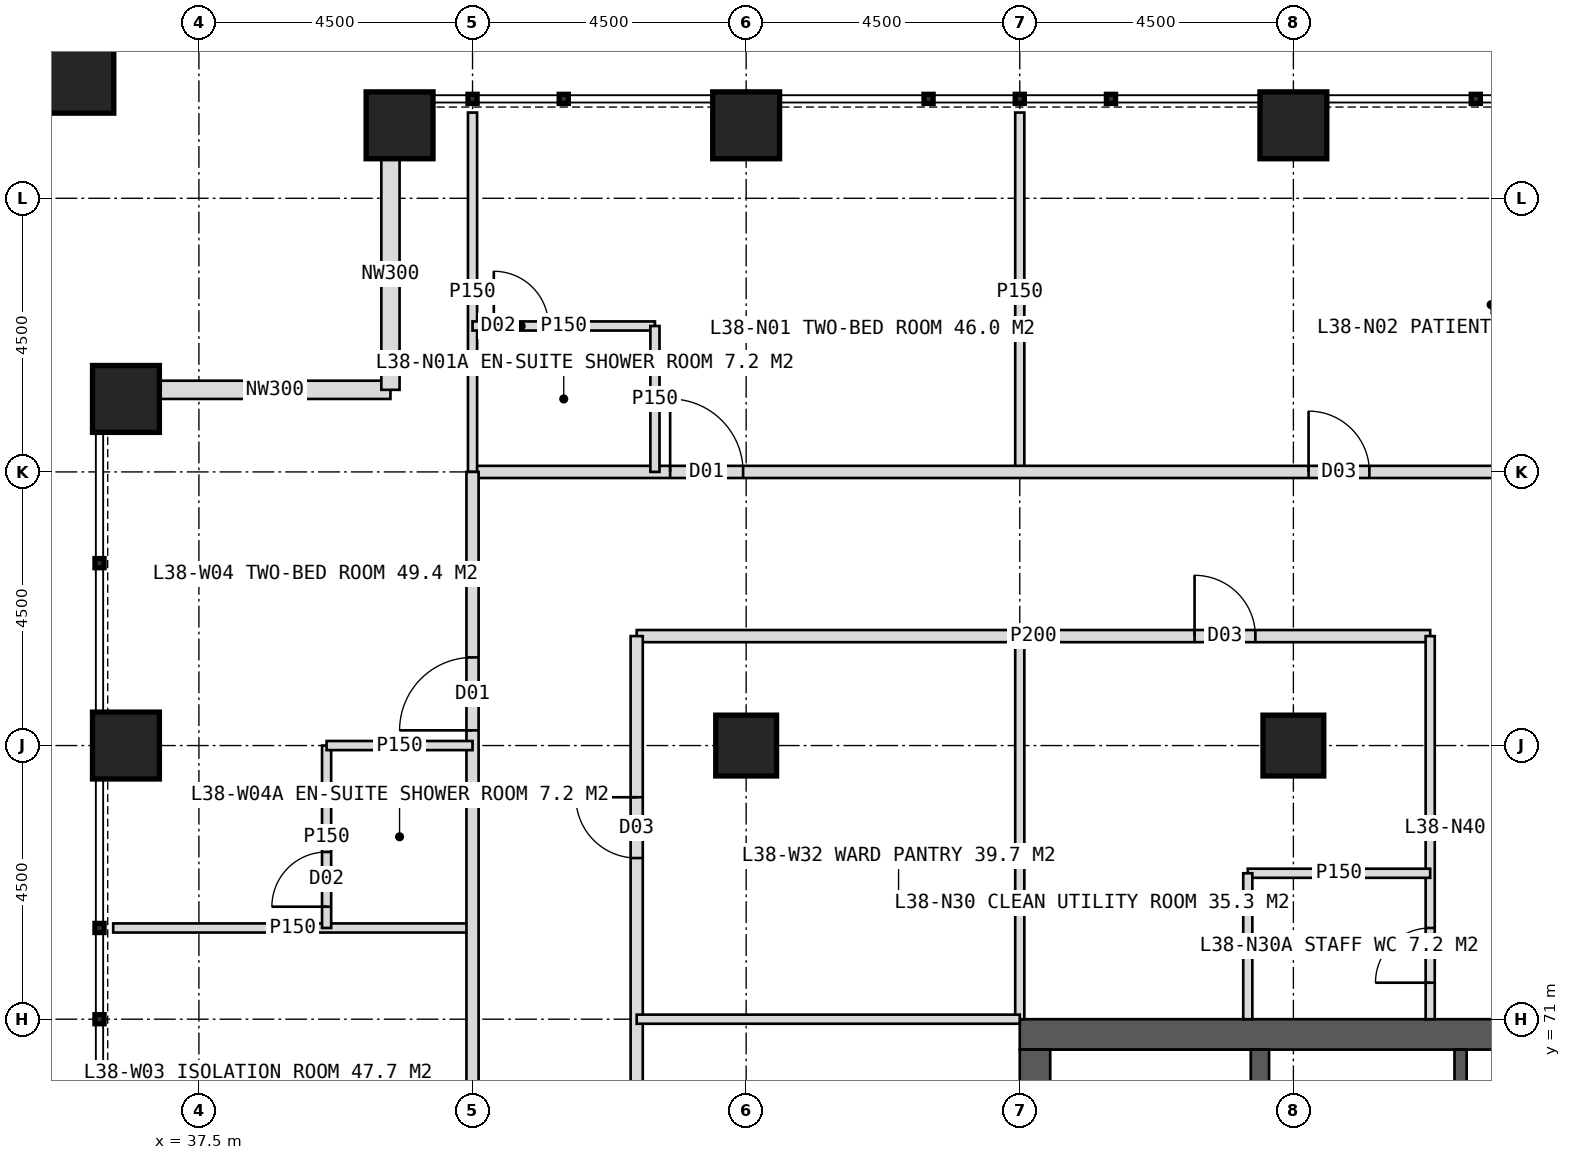
"""IFC4 building model, lengths in metres.
Left out: names, types, materials, properties, quantities, classifications, styles, units other than length and angle.
Written with IfcOpenShell. Run it as: python <this file> out.ifc"""

import sys

from ifc_helpers import new_model, si_unit, direction, frame, frame_2d, origin, origin_2d, place, context, subcontext, project, spatial, rectangle, hollow_rectangle, extrude, element, fill, save


model = new_model("IFC4")
c1 = context("Model", 3, precision=1e-05, world=origin(), true_north=direction((0.0, 1.0)))
c2 = subcontext(c1, "Body", "Model", "MODEL_VIEW")
j1 = project(units=[si_unit("LENGTHUNIT", "METRE"), si_unit("PLANEANGLEUNIT", "RADIAN")], contexts=[c1])
p1 = place(None, origin())
s1 = spatial("IfcSite", under=j1, at=p1, CompositionType="ELEMENT")
p2 = place(p1, origin())
s2 = spatial("IfcBuilding", under=s1, at=p2, CompositionType="ELEMENT")
p3 = place(p2, frame((0.0, 0.0, 160.0)))
s3 = spatial("IfcBuildingStorey", under=s2, at=p3, CompositionType="ELEMENT", Elevation=160.0)
p4 = place(p3, frame((51.0, 70.75, 0.0), z_axis=(0.0, 0.0, 1.0), x_axis=(1.0, 0.0, 0.0)))
e1 = element("IfcWall", 1, at=p4, inside=s3, PredefinedType="SHEAR", context=c2, shape_type="SweptSolid", body=[
    extrude(rectangle(XDim=18.0, YDim=0.5, at=frame_2d((9.0, 0.0))), origin(), (0.0, 0.0, 1.0), 4.0),
])
p5 = place(p4, frame((8.1, 0.0, 0.0)))
e2 = element("IfcOpeningElement", 2, at=p5, cuts=e1, PredefinedType="OPENING", context=c2, shape_type="SweptSolid", body=[
    extrude(rectangle(XDim=1.8, YDim=2.2, at=frame_2d((0.9, 1.1))), frame((0.0, 0.26, 0.0), z_axis=(0.0, -1.0, 0.0), x_axis=(1.0, 0.0, 0.0)), (0.0, 0.0, 1.0), 0.52),
])
p6 = place(p3, frame((51.25, 53.5, 0.0), z_axis=(0.0, 0.0, 1.0), x_axis=(0.0, 1.0, 0.0)))
e3 = element("IfcWall", 3, at=p6, inside=s3, PredefinedType="SHEAR", context=c2, shape_type="SweptSolid", body=[
    extrude(rectangle(XDim=17.0, YDim=0.5, at=frame_2d((8.5, 0.0))), origin(), (0.0, 0.0, 1.0), 4.0),
])
p7 = place(p6, frame((6.0, 0.0, 0.0)))
e4 = element("IfcOpeningElement", 4, at=p7, cuts=e3, PredefinedType="OPENING", context=c2, shape_type="SweptSolid", body=[
    extrude(rectangle(XDim=1.5, YDim=2.2, at=frame_2d((0.75, 1.1))), frame((0.0, 0.26, 0.0), z_axis=(0.0, -1.0, 0.0), x_axis=(1.0, 0.0, 0.0)), (0.0, 0.0, 1.0), 0.52),
])
p8 = place(p3, frame((54.95, 53.5, 0.0), z_axis=(0.0, 0.0, 1.0), x_axis=(0.0, 1.0, 0.0)))
e5 = element("IfcWall", 5, at=p8, inside=s3, PredefinedType="SHEAR", context=c2, shape_type="SweptSolid", body=[
    extrude(rectangle(XDim=17.0, YDim=0.3, at=frame_2d((8.5, 0.0))), origin(), (0.0, 0.0, 1.0), 4.0),
])
p9 = place(p3, frame((58.25, 53.5, 0.0), z_axis=(0.0, 0.0, 1.0), x_axis=(0.0, 1.0, 0.0)))
e6 = element("IfcWall", 6, at=p9, inside=s3, PredefinedType="SHEAR", context=c2, shape_type="SweptSolid", body=[
    extrude(rectangle(XDim=17.0, YDim=0.2, at=frame_2d((8.5, 0.0))), origin(), (0.0, 0.0, 1.0), 4.0),
])
p10 = place(p9, frame((1.375, 0.0, 0.0)))
e7 = element("IfcOpeningElement", 7, at=p10, cuts=e6, PredefinedType="OPENING", context=c2, shape_type="SweptSolid", body=[
    extrude(rectangle(XDim=1.4, YDim=2.2, at=frame_2d((0.7, 1.1))), frame((0.0, 0.11, 0.0), z_axis=(0.0, -1.0, 0.0), x_axis=(1.0, 0.0, 0.0)), (0.0, 0.0, 1.0), 0.22),
])
p11 = place(p9, frame((5.675, 0.0, 0.0)))
e8 = element("IfcOpeningElement", 8, at=p11, cuts=e6, PredefinedType="OPENING", context=c2, shape_type="SweptSolid", body=[
    extrude(rectangle(XDim=1.4, YDim=2.2, at=frame_2d((0.7, 1.1))), frame((0.0, 0.11, 0.0), z_axis=(0.0, -1.0, 0.0), x_axis=(1.0, 0.0, 0.0)), (0.0, 0.0, 1.0), 0.22),
])
for number, where, z_axis, x_axis in (
    (9, (46.5, 75.5, 0.0), (0.0, 0.0, 1.0), (1.0, 0.0, 0.0)),
    (10, (55.5, 75.5, 0.0), (0.0, 0.0, 1.0), (1.0, 0.0, 0.0)),
):
    element("IfcColumn", number, at=place(p3, frame(where, z_axis=z_axis, x_axis=x_axis)), inside=s3, PredefinedType="COLUMN", context=c2, shape_type="SweptSolid", body=[
        extrude(hollow_rectangle(XDim=1.0, YDim=1.0, WallThickness=0.1, at=origin_2d()), origin(), (0.0, 0.0, 1.0), 4.0),
    ])
for number, where, z_axis, x_axis in (
    (11, (40.8, 85.7, 0.0), (0.0, 0.0, 1.0), (1.0, 0.0, 0.0)),
    (12, (46.5, 85.7, 0.0), (0.0, 0.0, 1.0), (1.0, 0.0, 0.0)),
    (13, (55.5, 85.7, 0.0), (0.0, 0.0, 1.0), (1.0, 0.0, 0.0)),
    (14, (36.3, 75.5, 0.0), (0.0, 0.0, 1.0), (1.0, 0.0, 0.0)),
    (15, (36.3, 81.2, 0.0), (0.0, 0.0, 1.0), (1.0, 0.0, 0.0)),
):
    element("IfcColumn", number, at=place(p3, frame(where, z_axis=z_axis, x_axis=x_axis)), inside=s3, PredefinedType="COLUMN", context=c2, shape_type="SweptSolid", body=[
        extrude(hollow_rectangle(XDim=1.1, YDim=1.1, WallThickness=0.1, at=origin_2d()), origin(), (0.0, 0.0, 1.0), 4.0),
    ])
p12 = place(p3, frame((35.4, 86.6, 0.0), z_axis=(0.0, 0.0, 1.0), x_axis=(1.0, 0.0, 0.0)))
e16 = element("IfcColumn", 16, at=p12, inside=s3, PredefinedType="COLUMN", context=c2, shape_type="SweptSolid", body=[
    extrude(hollow_rectangle(XDim=1.4, YDim=1.4, WallThickness=0.08, at=origin_2d()), origin(), (0.0, 0.0, 1.0), 4.0),
])
for number, where, z_axis, x_axis in (
    (17, (36.85, 81.35, 0.0), (0.0, 0.0, 1.0), (1.0, 0.0, 0.0)),
    (18, (40.65, 81.35, 0.0), (0.0, 0.0, 1.0), (0.0, 1.0, 0.0)),
):
    element("IfcWall", number, at=place(p3, frame(where, z_axis=z_axis, x_axis=x_axis)), inside=s3, PredefinedType="ELEMENTEDWALL", context=c2, shape_type="SweptSolid", body=[
        extrude(rectangle(XDim=3.8, YDim=0.3, at=frame_2d((1.9, 0.0))), origin(), (0.0, 0.0, 1.0), 4.0),
    ])
p13 = place(p3, frame((51.0, 80.0, 0.0), z_axis=(0.0, 0.0, 1.0), x_axis=(0.0, 1.0, 0.0)))
e19 = element("IfcWall", 19, at=p13, inside=s3, PredefinedType="PARTITIONING", context=c2, shape_type="SweptSolid", body=[
    extrude(rectangle(XDim=5.91, YDim=0.15, at=frame_2d((2.955, 0.0))), origin(), (0.0, 0.0, 1.0), 3.75),
])
p14 = place(p3, frame((42.0, 80.0, 0.0), z_axis=(0.0, 0.0, 1.0), x_axis=(1.0, 0.0, 0.0)))
e20 = element("IfcWall", 20, at=p14, inside=s3, PredefinedType="PARTITIONING", context=c2, shape_type="SweptSolid", body=[
    extrude(rectangle(XDim=36.0, YDim=0.2, at=frame_2d((18.0, 0.0))), origin(), (0.0, 0.0, 1.0), 3.75),
])
p15 = place(p14, frame((3.25, 0.0, 0.0)))
e21 = element("IfcOpeningElement", 21, at=p15, cuts=e20, PredefinedType="OPENING", context=c2, shape_type="SweptSolid", body=[
    extrude(rectangle(XDim=1.2, YDim=2.2, at=frame_2d((0.6, 1.1))), frame((0.0, 0.11, 0.0), z_axis=(0.0, -1.0, 0.0), x_axis=(1.0, 0.0, 0.0)), (0.0, 0.0, 1.0), 0.22),
])
p16 = place(p14, frame((13.75, 0.0, 0.0)))
e22 = element("IfcOpeningElement", 22, at=p16, cuts=e20, PredefinedType="OPENING", context=c2, shape_type="SweptSolid", body=[
    extrude(rectangle(XDim=1.0, YDim=2.1, at=frame_2d((0.5, 1.05))), frame((0.0, 0.11, 0.0), z_axis=(0.0, -1.0, 0.0), x_axis=(1.0, 0.0, 0.0)), (0.0, 0.0, 1.0), 0.22),
])
p17 = place(p14, frame((22.15, 0.0, 0.0)))
e23 = element("IfcOpeningElement", 23, at=p17, cuts=e20, PredefinedType="OPENING", context=c2, shape_type="SweptSolid", body=[
    extrude(rectangle(XDim=1.2, YDim=2.2, at=frame_2d((0.6, 1.1))), frame((0.0, 0.11, 0.0), z_axis=(0.0, -1.0, 0.0), x_axis=(1.0, 0.0, 0.0)), (0.0, 0.0, 1.0), 0.22),
])
p18 = place(p3, frame((42.0, 80.0, 0.0), z_axis=(0.0, 0.0, 1.0), x_axis=(0.0, 1.0, 0.0)))
e24 = element("IfcWall", 24, at=p18, inside=s3, PredefinedType="PARTITIONING", context=c2, shape_type="SweptSolid", body=[
    extrude(rectangle(XDim=5.91, YDim=0.15, at=frame_2d((2.955, 0.0))), origin(), (0.0, 0.0, 1.0), 3.75),
])
p19 = place(p3, frame((42.0, 82.4, 0.0), z_axis=(0.0, 0.0, 1.0), x_axis=(1.0, 0.0, 0.0)))
e25 = element("IfcWall", 25, at=p19, inside=s3, PredefinedType="PARTITIONING", context=c2, shape_type="SweptSolid", body=[
    extrude(rectangle(XDim=3.0, YDim=0.15, at=frame_2d((1.5, 0.0))), origin(), (0.0, 0.0, 1.0), 3.75),
])
p20 = place(p19, frame((0.35, 0.0, 0.0)))
e26 = element("IfcOpeningElement", 26, at=p20, cuts=e25, PredefinedType="OPENING", context=c2, shape_type="SweptSolid", body=[
    extrude(rectangle(XDim=0.9, YDim=2.1, at=frame_2d((0.45, 1.05))), frame((0.0, 0.085, 0.0), z_axis=(0.0, -1.0, 0.0), x_axis=(1.0, 0.0, 0.0)), (0.0, 0.0, 1.0), 0.17),
])
p21 = place(p3, frame((45.0, 80.0, 0.0), z_axis=(0.0, 0.0, 1.0), x_axis=(0.0, 1.0, 0.0)))
e27 = element("IfcWall", 27, at=p21, inside=s3, PredefinedType="PARTITIONING", context=c2, shape_type="SweptSolid", body=[
    extrude(rectangle(XDim=2.4, YDim=0.15, at=frame_2d((1.2, 0.0))), origin(), (0.0, 0.0, 1.0), 3.75),
])
p22 = place(p3, frame((51.0, 71.0, 0.0), z_axis=(0.0, 0.0, 1.0), x_axis=(0.0, 1.0, 0.0)))
e28 = element("IfcWall", 28, at=p22, inside=s3, PredefinedType="PARTITIONING", context=c2, shape_type="SweptSolid", body=[
    extrude(rectangle(XDim=6.3, YDim=0.15, at=frame_2d((3.15, 0.0))), origin(), (0.0, 0.0, 1.0), 3.75),
])
p23 = place(p3, frame((44.7, 77.3, 0.0), z_axis=(0.0, 0.0, 1.0), x_axis=(1.0, 0.0, 0.0)))
e29 = element("IfcWall", 29, at=p23, inside=s3, PredefinedType="PARTITIONING", context=c2, shape_type="SweptSolid", body=[
    extrude(rectangle(XDim=13.05, YDim=0.2, at=frame_2d((6.525, 0.0))), origin(), (0.0, 0.0, 1.0), 3.75),
])
p24 = place(p23, frame((9.175, 0.0, 0.0)))
e30 = element("IfcOpeningElement", 30, at=p24, cuts=e29, PredefinedType="OPENING", context=c2, shape_type="SweptSolid", body=[
    extrude(rectangle(XDim=1.0, YDim=2.1, at=frame_2d((0.5, 1.05))), frame((0.0, 0.11, 0.0), z_axis=(0.0, -1.0, 0.0), x_axis=(1.0, 0.0, 0.0)), (0.0, 0.0, 1.0), 0.22),
])
p25 = place(p3, frame((57.75, 71.0, 0.0), z_axis=(0.0, 0.0, 1.0), x_axis=(0.0, 1.0, 0.0)))
e31 = element("IfcWall", 31, at=p25, inside=s3, PredefinedType="PARTITIONING", context=c2, shape_type="SweptSolid", body=[
    extrude(rectangle(XDim=6.3, YDim=0.15, at=frame_2d((3.15, 0.0))), origin(), (0.0, 0.0, 1.0), 3.75),
])
p26 = place(p25, frame((0.6, 0.0, 0.0)))
e32 = element("IfcOpeningElement", 32, at=p26, cuts=e31, PredefinedType="OPENING", context=c2, shape_type="SweptSolid", body=[
    extrude(rectangle(XDim=0.9, YDim=2.1, at=frame_2d((0.45, 1.05))), frame((0.0, 0.085, 0.0), z_axis=(0.0, -1.0, 0.0), x_axis=(1.0, 0.0, 0.0)), (0.0, 0.0, 1.0), 0.17),
])
p27 = place(p3, frame((54.75, 73.4, 0.0), z_axis=(0.0, 0.0, 1.0), x_axis=(1.0, 0.0, 0.0)))
e33 = element("IfcWall", 33, at=p27, inside=s3, PredefinedType="PARTITIONING", context=c2, shape_type="SweptSolid", body=[
    extrude(rectangle(XDim=3.0, YDim=0.15, at=frame_2d((1.5, 0.0))), origin(), (0.0, 0.0, 1.0), 3.75),
])
p28 = place(p3, frame((54.75, 71.0, 0.0), z_axis=(0.0, 0.0, 1.0), x_axis=(0.0, 1.0, 0.0)))
e34 = element("IfcWall", 34, at=p28, inside=s3, PredefinedType="PARTITIONING", context=c2, shape_type="SweptSolid", body=[
    extrude(rectangle(XDim=2.4, YDim=0.15, at=frame_2d((1.2, 0.0))), origin(), (0.0, 0.0, 1.0), 3.75),
])
p29 = place(p3, frame((42.0, 72.5, 0.0), z_axis=(0.0, 0.0, 1.0), x_axis=(-1.0, 0.0, 0.0)))
e35 = element("IfcWall", 35, at=p29, inside=s3, PredefinedType="PARTITIONING", context=c2, shape_type="SweptSolid", body=[
    extrude(rectangle(XDim=5.91, YDim=0.15, at=frame_2d((2.955, 0.0))), origin(), (0.0, 0.0, 1.0), 3.75),
])
p30 = place(p3, frame((42.0, 44.0, 0.0), z_axis=(0.0, 0.0, 1.0), x_axis=(0.0, 1.0, 0.0)))
e36 = element("IfcWall", 36, at=p30, inside=s3, PredefinedType="PARTITIONING", context=c2, shape_type="SweptSolid", body=[
    extrude(rectangle(XDim=36.0, YDim=0.2, at=frame_2d((18.0, 0.0))), origin(), (0.0, 0.0, 1.0), 3.75),
])
p31 = place(p30, frame((3.25, 0.0, 0.0)))
e37 = element("IfcOpeningElement", 37, at=p31, cuts=e36, PredefinedType="OPENING", context=c2, shape_type="SweptSolid", body=[
    extrude(rectangle(XDim=1.2, YDim=2.2, at=frame_2d((0.6, 1.1))), frame((0.0, 0.11, 0.0), z_axis=(0.0, -1.0, 0.0), x_axis=(1.0, 0.0, 0.0)), (0.0, 0.0, 1.0), 0.22),
])
p32 = place(p30, frame((12.25, 0.0, 0.0)))
e38 = element("IfcOpeningElement", 38, at=p32, cuts=e36, PredefinedType="OPENING", context=c2, shape_type="SweptSolid", body=[
    extrude(rectangle(XDim=1.2, YDim=2.2, at=frame_2d((0.6, 1.1))), frame((0.0, 0.11, 0.0), z_axis=(0.0, -1.0, 0.0), x_axis=(1.0, 0.0, 0.0)), (0.0, 0.0, 1.0), 0.22),
])
p33 = place(p30, frame((21.25, 0.0, 0.0)))
e39 = element("IfcOpeningElement", 39, at=p33, cuts=e36, PredefinedType="OPENING", context=c2, shape_type="SweptSolid", body=[
    extrude(rectangle(XDim=1.2, YDim=2.2, at=frame_2d((0.6, 1.1))), frame((0.0, 0.11, 0.0), z_axis=(0.0, -1.0, 0.0), x_axis=(1.0, 0.0, 0.0)), (0.0, 0.0, 1.0), 0.22),
])
p34 = place(p30, frame((31.75, 0.0, 0.0)))
e40 = element("IfcOpeningElement", 40, at=p34, cuts=e36, PredefinedType="OPENING", context=c2, shape_type="SweptSolid", body=[
    extrude(rectangle(XDim=1.2, YDim=2.2, at=frame_2d((0.6, 1.1))), frame((0.0, 0.11, 0.0), z_axis=(0.0, -1.0, 0.0), x_axis=(1.0, 0.0, 0.0)), (0.0, 0.0, 1.0), 0.22),
])
p35 = place(p3, frame((39.6, 72.5, 0.0), z_axis=(0.0, 0.0, 1.0), x_axis=(0.0, 1.0, 0.0)))
e41 = element("IfcWall", 41, at=p35, inside=s3, PredefinedType="PARTITIONING", context=c2, shape_type="SweptSolid", body=[
    extrude(rectangle(XDim=3.0, YDim=0.15, at=frame_2d((1.5, 0.0))), origin(), (0.0, 0.0, 1.0), 3.75),
])
p36 = place(p35, frame((0.35, 0.0, 0.0)))
e42 = element("IfcOpeningElement", 42, at=p36, cuts=e41, PredefinedType="OPENING", context=c2, shape_type="SweptSolid", body=[
    extrude(rectangle(XDim=0.9, YDim=2.1, at=frame_2d((0.45, 1.05))), frame((0.0, 0.085, 0.0), z_axis=(0.0, -1.0, 0.0), x_axis=(1.0, 0.0, 0.0)), (0.0, 0.0, 1.0), 0.17),
])
p37 = place(p3, frame((42.0, 75.5, 0.0), z_axis=(0.0, 0.0, 1.0), x_axis=(-1.0, 0.0, 0.0)))
e43 = element("IfcWall", 43, at=p37, inside=s3, PredefinedType="PARTITIONING", context=c2, shape_type="SweptSolid", body=[
    extrude(rectangle(XDim=2.4, YDim=0.15, at=frame_2d((1.2, 0.0))), origin(), (0.0, 0.0, 1.0), 2.95),
])
p38 = place(p3, frame((44.7, 62.0, 0.0), z_axis=(0.0, 0.0, 1.0), x_axis=(0.0, 1.0, 0.0)))
e44 = element("IfcWall", 44, at=p38, inside=s3, PredefinedType="PARTITIONING", context=c2, shape_type="SweptSolid", body=[
    extrude(rectangle(XDim=15.3, YDim=0.2, at=frame_2d((7.65, 0.0))), origin(), (0.0, 0.0, 1.0), 3.75),
])
p39 = place(p38, frame((4.0, 0.0, 0.0)))
e45 = element("IfcOpeningElement", 45, at=p39, cuts=e44, PredefinedType="OPENING", context=c2, shape_type="SweptSolid", body=[
    extrude(rectangle(XDim=1.0, YDim=2.1, at=frame_2d((0.5, 1.05))), frame((0.0, 0.11, 0.0), z_axis=(0.0, -1.0, 0.0), x_axis=(1.0, 0.0, 0.0)), (0.0, 0.0, 1.0), 0.22),
])
p40 = place(p38, frame((11.65, 0.0, 0.0)))
e46 = element("IfcOpeningElement", 46, at=p40, cuts=e44, PredefinedType="OPENING", context=c2, shape_type="SweptSolid", body=[
    extrude(rectangle(XDim=1.0, YDim=2.1, at=frame_2d((0.5, 1.05))), frame((0.0, 0.11, 0.0), z_axis=(0.0, -1.0, 0.0), x_axis=(1.0, 0.0, 0.0)), (0.0, 0.0, 1.0), 0.22),
])
p41 = place(p3, frame((51.0, 71.0, 0.0), z_axis=(0.0, 0.0, 1.0), x_axis=(-1.0, 0.0, 0.0)))
e47 = element("IfcWall", 47, at=p41, inside=s3, PredefinedType="PARTITIONING", context=c2, shape_type="SweptSolid", body=[
    extrude(rectangle(XDim=6.3, YDim=0.15, at=frame_2d((3.15, 0.0))), origin(), (0.0, 0.0, 1.0), 3.75),
])
p42 = place(p15, origin())
e48 = element("IfcDoor", 48, at=p42, inside=s3, OperationType="SINGLE_SWING_LEFT", PredefinedType="DOOR", context=c2, shape_type="SweptSolid", body=[
    extrude(rectangle(XDim=1.2, YDim=2.2, at=frame_2d((0.6, 1.1))), frame((0.0, 0.025, 0.0), z_axis=(0.0, -1.0, 0.0), x_axis=(1.0, 0.0, 0.0)), (0.0, 0.0, 1.0), 0.05),
])
fill(e21, e48)
p43 = place(p20, origin())
e49 = element("IfcDoor", 49, at=p43, inside=s3, OperationType="SINGLE_SWING_LEFT", PredefinedType="DOOR", context=c2, shape_type="SweptSolid", body=[
    extrude(rectangle(XDim=0.9, YDim=2.1, at=frame_2d((0.45, 1.05))), frame((0.0, 0.025, 0.0), z_axis=(0.0, -1.0, 0.0), x_axis=(1.0, 0.0, 0.0)), (0.0, 0.0, 1.0), 0.05),
])
fill(e26, e49)
p44 = place(p16, origin())
e50 = element("IfcDoor", 50, at=p44, inside=s3, OperationType="SINGLE_SWING_LEFT", PredefinedType="DOOR", context=c2, shape_type="SweptSolid", body=[
    extrude(rectangle(XDim=1.0, YDim=2.1, at=frame_2d((0.5, 1.05))), frame((0.0, 0.025, 0.0), z_axis=(0.0, -1.0, 0.0), x_axis=(1.0, 0.0, 0.0)), (0.0, 0.0, 1.0), 0.05),
])
fill(e22, e50)
p45 = place(p26, origin())
e51 = element("IfcDoor", 51, at=p45, inside=s3, OperationType="SINGLE_SWING_LEFT", PredefinedType="DOOR", context=c2, shape_type="SweptSolid", body=[
    extrude(rectangle(XDim=0.9, YDim=2.1, at=frame_2d((0.45, 1.05))), frame((0.0, 0.025, 0.0), z_axis=(0.0, -1.0, 0.0), x_axis=(1.0, 0.0, 0.0)), (0.0, 0.0, 1.0), 0.05),
])
fill(e32, e51)
p46 = place(p24, origin())
e52 = element("IfcDoor", 52, at=p46, inside=s3, OperationType="SINGLE_SWING_LEFT", PredefinedType="DOOR", context=c2, shape_type="SweptSolid", body=[
    extrude(rectangle(XDim=1.0, YDim=2.1, at=frame_2d((0.5, 1.05))), frame((0.0, 0.025, 0.0), z_axis=(0.0, -1.0, 0.0), x_axis=(1.0, 0.0, 0.0)), (0.0, 0.0, 1.0), 0.05),
])
fill(e30, e52)
p47 = place(p34, origin())
e53 = element("IfcDoor", 53, at=p47, inside=s3, OperationType="SINGLE_SWING_LEFT", PredefinedType="DOOR", context=c2, shape_type="SweptSolid", body=[
    extrude(rectangle(XDim=1.2, YDim=2.2, at=frame_2d((0.6, 1.1))), frame((0.0, 0.025, 0.0), z_axis=(0.0, -1.0, 0.0), x_axis=(1.0, 0.0, 0.0)), (0.0, 0.0, 1.0), 0.05),
])
fill(e40, e53)
p48 = place(p36, origin())
e54 = element("IfcDoor", 54, at=p48, inside=s3, OperationType="SINGLE_SWING_LEFT", PredefinedType="DOOR", context=c2, shape_type="SweptSolid", body=[
    extrude(rectangle(XDim=0.9, YDim=2.1, at=frame_2d((0.45, 1.05))), frame((0.0, 0.025, 0.0), z_axis=(0.0, -1.0, 0.0), x_axis=(1.0, 0.0, 0.0)), (0.0, 0.0, 1.0), 0.05),
])
fill(e42, e54)
p49 = place(p40, origin())
e55 = element("IfcDoor", 55, at=p49, inside=s3, OperationType="SINGLE_SWING_RIGHT", PredefinedType="DOOR", context=c2, shape_type="SweptSolid", body=[
    extrude(rectangle(XDim=1.0, YDim=2.1, at=frame_2d((0.5, 1.05))), frame((0.0, 0.025, 0.0), z_axis=(0.0, -1.0, 0.0), x_axis=(1.0, 0.0, 0.0)), (0.0, 0.0, 1.0), 0.05),
])
fill(e46, e55)
save(model, sys.argv[1])
